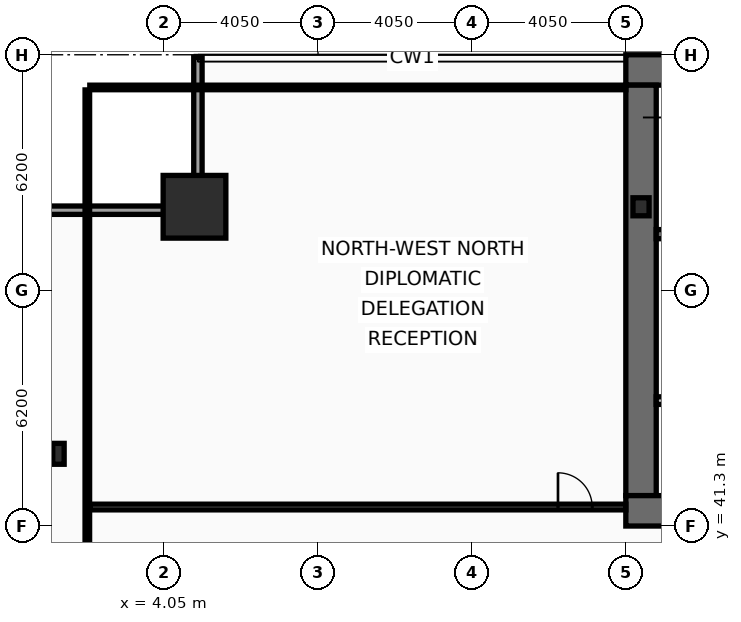
"""IFC4 building model, lengths in metres.
Left out: names, types, materials, properties, quantities, classifications, styles, units other than length and angle.
Written with IfcOpenShell. Run it as: python <this file> out.ifc"""

import sys

from ifc_helpers import new_model, si_unit, direction, frame, frame_2d, origin, origin_2d, place, context, subcontext, project, spatial, rectangle, hollow_rectangle, i_section, extrude, element, fill, save


model = new_model("IFC4")
c1 = context("Model", 3, precision=1e-05, world=origin(), true_north=direction((0.0, 1.0)))
c2 = subcontext(c1, "Body", "Model", "MODEL_VIEW")
j1 = project(units=[si_unit("LENGTHUNIT", "METRE"), si_unit("PLANEANGLEUNIT", "RADIAN")], contexts=[c1])
p1 = place(None, origin())
s1 = spatial("IfcSite", under=j1, at=p1, CompositionType="ELEMENT")
p2 = place(p1, origin())
s2 = spatial("IfcBuilding", under=s1, at=p2, CompositionType="ELEMENT")
p3 = place(p2, frame((0.0, 0.0, 77.8)))
s3 = spatial("IfcBuildingStorey", under=s2, at=p3, CompositionType="ELEMENT", Elevation=77.8)
p4 = place(p3, frame((16.2, 53.3, 0.0), z_axis=(0.0, 0.0, 1.0), x_axis=(1.0, 0.0, 0.0)))
e1 = element("IfcWall", 1, at=p4, inside=s3, PredefinedType="SHEAR", context=c2, shape_type="SweptSolid", body=[
    extrude(rectangle(XDim=40.5, YDim=0.8, at=frame_2d((20.25, 0.0))), origin(), (0.0, 0.0, 1.0), 3.82),
])
p5 = place(p3, frame((16.6, 42.1, 0.0), z_axis=(0.0, 0.0, 1.0), x_axis=(0.0, 1.0, 0.0)))
e2 = element("IfcWall", 2, at=p5, inside=s3, PredefinedType="SHEAR", context=c2, shape_type="SweptSolid", body=[
    extrude(rectangle(XDim=10.8, YDim=0.8, at=frame_2d((5.4, 0.0))), origin(), (0.0, 0.0, 1.0), 3.82),
])
p6 = place(p3, frame((18.65, 41.7, 0.0), z_axis=(0.0, 0.0, 1.0), x_axis=(-1.0, 0.0, 0.0)))
e3 = element("IfcWall", 3, at=p6, inside=s3, PredefinedType="SHEAR", context=c2, shape_type="SweptSolid", body=[
    extrude(rectangle(XDim=2.45, YDim=0.8, at=frame_2d((1.225, 0.0))), origin(), (0.0, 0.0, 1.0), 3.82),
])
p7 = place(p3, frame((17.0, 48.98, 0.0), z_axis=(0.0, 0.0, 1.0), x_axis=(1.0, 0.0, 0.0)))
e4 = element("IfcWall", 4, at=p7, inside=s3, PredefinedType="SHEAR", context=c2, shape_type="SweptSolid", body=[
    extrude(rectangle(XDim=7.22, YDim=0.24, at=frame_2d((3.61, 0.0))), origin(), (0.0, 0.0, 1.0), 3.82),
])
p8 = place(p7, frame((0.22, 0.0, 0.0)))
e5 = element("IfcOpeningElement", 5, at=p8, cuts=e4, PredefinedType="OPENING", context=c2, shape_type="SweptSolid", body=[
    extrude(rectangle(XDim=1.05, YDim=2.15, at=frame_2d((0.525, 1.075))), frame((0.0, 0.13, 0.0), z_axis=(0.0, -1.0, 0.0), x_axis=(1.0, 0.0, 0.0)), (0.0, 0.0, 1.0), 0.26),
])
p9 = place(p3, frame((4.85, 49.7, 0.0), z_axis=(0.0, 0.0, 1.0), x_axis=(1.0, 0.0, 0.0)))
e6 = element("IfcColumn", 6, at=p9, inside=s3, PredefinedType="COLUMN", context=c2, shape_type="SweptSolid", body=[
    extrude(hollow_rectangle(XDim=1.65, YDim=1.65, WallThickness=0.075, at=origin_2d()), origin(), (0.0, 0.0, 1.0), 4.0),
])
p10 = place(p3, frame((1.27, 43.2, 0.0), z_axis=(0.0, 0.0, 1.0), x_axis=(1.0, 0.0, 0.0)))
e7 = element("IfcColumn", 7, at=p10, inside=s3, PredefinedType="COLUMN", context=c2, shape_type="SweptSolid", body=[
    extrude(i_section(OverallWidth=0.3, OverallDepth=0.55, WebThickness=0.015, FlangeThickness=0.029, at=origin_2d()), origin(), (0.0, 0.0, 1.0), 4.0),
])
p11 = place(p3, frame((16.6, 49.7, 0.0), z_axis=(0.0, 0.0, 1.0), x_axis=(1.0, 0.0, 0.0)))
e8 = element("IfcColumn", 8, at=p11, inside=s3, PredefinedType="COLUMN", context=c2, shape_type="SweptSolid", body=[
    extrude(i_section(OverallWidth=0.424, OverallDepth=0.474, WebThickness=0.048, FlangeThickness=0.077, at=origin_2d()), origin(), (0.0, 0.0, 1.0), 4.0),
])
p12 = place(p3, frame((0.92, 49.61, 0.0), z_axis=(0.0, 0.0, 1.0), x_axis=(1.0, 0.0, 0.0)))
e9 = element("IfcWall", 9, at=p12, inside=s3, PredefinedType="SOLIDWALL", context=c2, shape_type="SweptSolid", body=[
    extrude(rectangle(XDim=4.13, YDim=0.22, at=frame_2d((2.065, 0.0))), origin(), (0.0, 0.0, 1.0), 2.47),
])
p13 = place(p3, frame((4.94, 49.72, 0.0), z_axis=(0.0, 0.0, 1.0), x_axis=(0.0, 1.0, 0.0)))
e10 = element("IfcWall", 10, at=p13, inside=s3, PredefinedType="SOLIDWALL", context=c2, shape_type="SweptSolid", body=[
    extrude(rectangle(XDim=3.91, YDim=0.22, at=frame_2d((1.955, 0.0))), origin(), (0.0, 0.0, 1.0), 2.47),
])
p14 = place(p3, frame((17.0, 44.6, 0.0), z_axis=(0.0, 0.0, 1.0), x_axis=(1.0, 0.0, 0.0)))
e11 = element("IfcWall", 11, at=p14, inside=s3, PredefinedType="PARTITIONING", context=c2, shape_type="SweptSolid", body=[
    extrude(rectangle(XDim=4.0, YDim=0.2, at=frame_2d((2.0, 0.0))), origin(), (0.0, 0.0, 1.0), 3.82),
])
p15 = place(p14, frame((1.25, 0.0, 0.0)))
e12 = element("IfcOpeningElement", 12, at=p15, cuts=e11, PredefinedType="OPENING", context=c2, shape_type="SweptSolid", body=[
    extrude(rectangle(XDim=1.05, YDim=2.15, at=frame_2d((0.525, 1.075))), frame((0.0, 0.11, 0.0), z_axis=(0.0, -1.0, 0.0), x_axis=(1.0, 0.0, 0.0)), (0.0, 0.0, 1.0), 0.22),
])
p16 = place(p3, frame((2.095, 41.8, 0.0), z_axis=(0.0, 0.0, 1.0), x_axis=(1.0, 0.0, 0.0)))
e13 = element("IfcWall", 13, at=p16, inside=s3, PredefinedType="PARTITIONING", context=c2, shape_type="SweptSolid", body=[
    extrude(rectangle(XDim=14.105, YDim=0.15, at=frame_2d((7.052, 0.0))), origin(), (0.0, 0.0, 1.0), 3.16),
])
p17 = place(p16, frame((12.32, 0.0, 0.0)))
e14 = element("IfcOpeningElement", 14, at=p17, cuts=e13, PredefinedType="OPENING", context=c2, shape_type="SweptSolid", body=[
    extrude(rectangle(XDim=0.9, YDim=2.05, at=frame_2d((0.45, 1.025))), frame((0.0, 0.085, 0.0), z_axis=(0.0, -1.0, 0.0), x_axis=(1.0, 0.0, 0.0)), (0.0, 0.0, 1.0), 0.17),
])
p18 = place(p3, frame((2.03, 10.665, 0.0), z_axis=(0.0, 0.0, 1.0), x_axis=(0.0, 1.0, 0.0)))
e15 = element("IfcWall", 15, at=p18, inside=s3, PredefinedType="PARTITIONING", context=c2, shape_type="SweptSolid", body=[
    extrude(rectangle(XDim=42.11, YDim=0.12, at=frame_2d((21.055, 0.0))), origin(), (0.0, 0.0, 1.0), 2.21),
])
p19 = place(p3, frame((2.095, 52.84, 0.0), z_axis=(0.0, 0.0, 1.0), x_axis=(1.0, 0.0, 0.0)))
e16 = element("IfcWall", 16, at=p19, inside=s3, PredefinedType="PARTITIONING", context=c2, shape_type="SweptSolid", body=[
    extrude(rectangle(XDim=14.105, YDim=0.12, at=frame_2d((7.052, 0.0))), origin(), (0.0, 0.0, 1.0), 3.82),
])
p20 = place(p17, origin())
e17 = element("IfcDoor", 17, at=p20, inside=s3, OperationType="SINGLE_SWING_LEFT", PredefinedType="DOOR", context=c2, shape_type="SweptSolid", body=[
    extrude(rectangle(XDim=0.9, YDim=2.05, at=frame_2d((0.45, 1.025))), frame((0.0, 0.025, 0.0), z_axis=(0.0, -1.0, 0.0), x_axis=(1.0, 0.0, 0.0)), (0.0, 0.0, 1.0), 0.05),
])
fill(e14, e17)
save(model, sys.argv[1])
